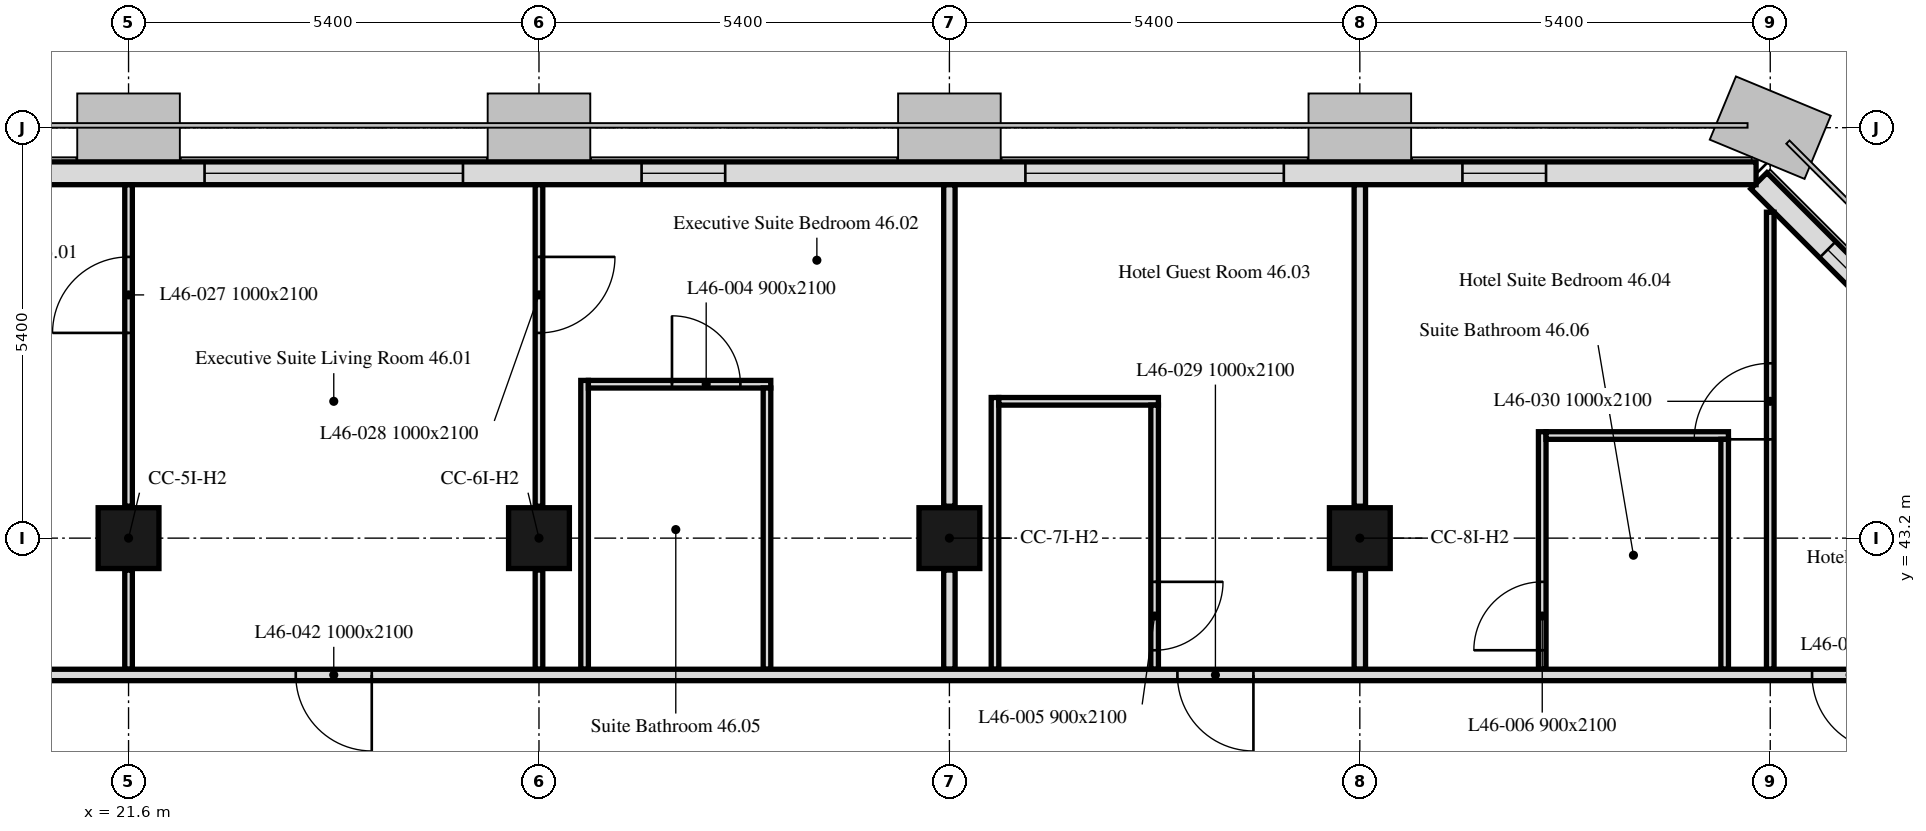
"""IFC4 building model, lengths in metres.
Left out: names, types, materials, properties, quantities, classifications, styles, units other than length and angle.
Written with IfcOpenShell. Run it as: python <this file> out.ifc"""

import sys

from ifc_helpers import new_model, si_unit, direction, frame, frame_2d, origin, origin_2d, place, context, subcontext, project, spatial, rectangle, extrude, element, fill, save


model = new_model("IFC4")
c1 = context("Model", 3, precision=1e-05, world=origin(), true_north=direction((0.0, 1.0)))
c2 = subcontext(c1, "Body", "Model", "MODEL_VIEW")
j1 = project(units=[si_unit("LENGTHUNIT", "METRE"), si_unit("PLANEANGLEUNIT", "RADIAN")], contexts=[c1])
p1 = place(None, origin())
s1 = spatial("IfcSite", under=j1, at=p1, CompositionType="ELEMENT")
p2 = place(p1, origin())
s2 = spatial("IfcBuilding", under=s1, at=p2, CompositionType="ELEMENT")
p3 = place(p2, frame((0.0, 0.0, 190.6)))
s3 = spatial("IfcBuildingStorey", under=s2, at=p3, CompositionType="ELEMENT", Elevation=190.6)
for number, where, z_axis, x_axis in (
    (1, (21.6, 43.2, 0.0), (0.0, 0.0, 1.0), (1.0, 0.0, 0.0)),
    (2, (27.0, 43.2, 0.0), (0.0, 0.0, 1.0), (1.0, 0.0, 0.0)),
    (3, (32.4, 43.2, 0.0), (0.0, 0.0, 1.0), (1.0, 0.0, 0.0)),
    (4, (37.8, 43.2, 0.0), (0.0, 0.0, 1.0), (1.0, 0.0, 0.0)),
):
    element("IfcColumn", number, at=place(p3, frame(where, z_axis=z_axis, x_axis=x_axis)), inside=s3, PredefinedType="COLUMN", context=c2, shape_type="SweptSolid", body=[
        extrude(rectangle(XDim=0.8, YDim=0.8, at=origin_2d()), origin(), (0.0, 0.0, 1.0), 3.0),
    ])
p4 = place(p3, frame((47.901, 43.051, 0.0), z_axis=(0.0, 0.0, 1.0), x_axis=(-0.707106781187, 0.707106781187, 0.0)))
e5 = element("IfcWall", 5, at=p4, inside=s3, PredefinedType="SOLIDWALL", context=c2, shape_type="SweptSolid", body=[
    extrude(rectangle(XDim=6.86, YDim=0.3, at=frame_2d((3.43, 0.0))), origin(), (0.0, 0.0, 1.0), 3.0),
])
p5 = place(p4, frame((1.28, 0.0, 0.9)))
e6 = element("IfcOpeningElement", 6, at=p5, cuts=e5, PredefinedType="OPENING", context=c2, shape_type="SweptSolid", body=[
    extrude(rectangle(XDim=1.1, YDim=1.7, at=frame_2d((0.55, 0.85))), frame((0.0, 0.16, 0.0), z_axis=(0.0, -1.0, 0.0), x_axis=(1.0, 0.0, 0.0)), (0.0, 0.0, 1.0), 0.32),
])
p6 = place(p4, frame((4.48, 0.0, 0.9)))
e7 = element("IfcOpeningElement", 7, at=p6, cuts=e5, PredefinedType="OPENING", context=c2, shape_type="SweptSolid", body=[
    extrude(rectangle(XDim=1.1, YDim=1.7, at=frame_2d((0.55, 0.85))), frame((0.0, 0.16, 0.0), z_axis=(0.0, -1.0, 0.0), x_axis=(1.0, 0.0, 0.0)), (0.0, 0.0, 1.0), 0.32),
])
p7 = place(p3, frame((43.014, 48.0, 0.0), z_axis=(0.0, 0.0, 1.0), x_axis=(-1.0, 0.0, 0.0)))
e8 = element("IfcWall", 8, at=p7, inside=s3, PredefinedType="SOLIDWALL", context=c2, shape_type="SweptSolid", body=[
    extrude(rectangle(XDim=32.027, YDim=0.3, at=frame_2d((16.014, 0.0))), origin(), (0.0, 0.0, 1.0), 3.0),
])
p8 = place(p7, frame((2.764, 0.0, 0.9)))
e9 = element("IfcOpeningElement", 9, at=p8, cuts=e8, PredefinedType="OPENING", context=c2, shape_type="SweptSolid", body=[
    extrude(rectangle(XDim=1.1, YDim=1.7, at=frame_2d((0.55, 0.85))), frame((0.0, 0.16, 0.0), z_axis=(0.0, -1.0, 0.0), x_axis=(1.0, 0.0, 0.0)), (0.0, 0.0, 1.0), 0.32),
])
p9 = place(p7, frame((6.214, 0.0, 0.9)))
e10 = element("IfcOpeningElement", 10, at=p9, cuts=e8, PredefinedType="OPENING", context=c2, shape_type="SweptSolid", body=[
    extrude(rectangle(XDim=3.4, YDim=1.7, at=frame_2d((1.7, 0.85))), frame((0.0, 0.16, 0.0), z_axis=(0.0, -1.0, 0.0), x_axis=(1.0, 0.0, 0.0)), (0.0, 0.0, 1.0), 0.32),
])
p10 = place(p7, frame((13.564, 0.0, 0.9)))
e11 = element("IfcOpeningElement", 11, at=p10, cuts=e8, PredefinedType="OPENING", context=c2, shape_type="SweptSolid", body=[
    extrude(rectangle(XDim=1.1, YDim=1.7, at=frame_2d((0.55, 0.85))), frame((0.0, 0.16, 0.0), z_axis=(0.0, -1.0, 0.0), x_axis=(1.0, 0.0, 0.0)), (0.0, 0.0, 1.0), 0.32),
])
p11 = place(p7, frame((17.014, 0.0, 0.9)))
e12 = element("IfcOpeningElement", 12, at=p11, cuts=e8, PredefinedType="OPENING", context=c2, shape_type="SweptSolid", body=[
    extrude(rectangle(XDim=3.4, YDim=1.7, at=frame_2d((1.7, 0.85))), frame((0.0, 0.16, 0.0), z_axis=(0.0, -1.0, 0.0), x_axis=(1.0, 0.0, 0.0)), (0.0, 0.0, 1.0), 0.32),
])
p12 = place(p7, frame((24.364, 0.0, 0.9)))
e13 = element("IfcOpeningElement", 13, at=p12, cuts=e8, PredefinedType="OPENING", context=c2, shape_type="SweptSolid", body=[
    extrude(rectangle(XDim=1.1, YDim=1.7, at=frame_2d((0.55, 0.85))), frame((0.0, 0.16, 0.0), z_axis=(0.0, -1.0, 0.0), x_axis=(1.0, 0.0, 0.0)), (0.0, 0.0, 1.0), 0.32),
])
p13 = place(p7, frame((27.814, 0.0, 0.9)))
e14 = element("IfcOpeningElement", 14, at=p13, cuts=e8, PredefinedType="OPENING", context=c2, shape_type="SweptSolid", body=[
    extrude(rectangle(XDim=3.4, YDim=1.7, at=frame_2d((1.7, 0.85))), frame((0.0, 0.16, 0.0), z_axis=(0.0, -1.0, 0.0), x_axis=(1.0, 0.0, 0.0)), (0.0, 0.0, 1.0), 0.32),
])
p14 = place(p3, frame((21.6, 41.475, 0.0), z_axis=(0.0, 0.0, 1.0), x_axis=(0.0, 1.0, 0.0)))
e15 = element("IfcWall", 15, at=p14, inside=s3, PredefinedType="PARTITIONING", context=c2, shape_type="SweptSolid", body=[
    extrude(rectangle(XDim=1.305, YDim=0.1, at=frame_2d((0.652, 0.0))), origin(), (0.0, 0.0, 1.0), 2.4),
])
p15 = place(p3, frame((21.6, 43.62, 0.0), z_axis=(0.0, 0.0, 1.0), x_axis=(0.0, 1.0, 0.0)))
e16 = element("IfcWall", 16, at=p15, inside=s3, PredefinedType="PARTITIONING", context=c2, shape_type="SweptSolid", body=[
    extrude(rectangle(XDim=4.229, YDim=0.1, at=frame_2d((2.115, 0.0))), origin(), (0.0, 0.0, 1.0), 2.4),
])
p16 = place(p15, frame((2.28, 0.0, 0.0)))
e17 = element("IfcOpeningElement", 17, at=p16, cuts=e16, PredefinedType="OPENING", context=c2, shape_type="SweptSolid", body=[
    extrude(rectangle(XDim=1.0, YDim=2.1, at=frame_2d((0.5, 1.05))), frame((0.0, 0.05, 0.0), z_axis=(0.0, -1.0, 0.0), x_axis=(1.0, 0.0, 0.0)), (0.0, 0.0, 1.0), 0.1),
])
p17 = place(p3, frame((27.0, 47.849, 0.0), z_axis=(0.0, 0.0, 1.0), x_axis=(0.0, -1.0, 0.0)))
e18 = element("IfcWall", 18, at=p17, inside=s3, PredefinedType="PARTITIONING", context=c2, shape_type="SweptSolid", body=[
    extrude(rectangle(XDim=4.229, YDim=0.1, at=frame_2d((2.115, 0.0))), origin(), (0.0, 0.0, 1.0), 2.4),
])
p18 = place(p17, frame((0.949, 0.0, 0.0)))
e19 = element("IfcOpeningElement", 19, at=p18, cuts=e18, PredefinedType="OPENING", context=c2, shape_type="SweptSolid", body=[
    extrude(rectangle(XDim=1.0, YDim=2.1, at=frame_2d((0.5, 1.05))), frame((0.0, 0.05, 0.0), z_axis=(0.0, -1.0, 0.0), x_axis=(1.0, 0.0, 0.0)), (0.0, 0.0, 1.0), 0.1),
])
p19 = place(p3, frame((27.0, 42.78, 0.0), z_axis=(0.0, 0.0, 1.0), x_axis=(0.0, -1.0, 0.0)))
e20 = element("IfcWall", 20, at=p19, inside=s3, PredefinedType="PARTITIONING", context=c2, shape_type="SweptSolid", body=[
    extrude(rectangle(XDim=1.305, YDim=0.1, at=frame_2d((0.652, 0.0))), origin(), (0.0, 0.0, 1.0), 2.4),
])
p20 = place(p3, frame((27.6, 41.475, 0.0), z_axis=(0.0, 0.0, 1.0), x_axis=(0.0, 1.0, 0.0)))
e21 = element("IfcWall", 21, at=p20, inside=s3, PredefinedType="PARTITIONING", context=c2, shape_type="SweptSolid", body=[
    extrude(rectangle(XDim=3.8, YDim=0.1, at=frame_2d((1.9, 0.0))), origin(), (0.0, 0.0, 1.0), 3.0),
])
p21 = place(p3, frame((27.65, 45.225, 0.0), z_axis=(0.0, 0.0, 1.0), x_axis=(1.0, 0.0, 0.0)))
e22 = element("IfcWall", 22, at=p21, inside=s3, PredefinedType="PARTITIONING", context=c2, shape_type="SweptSolid", body=[
    extrude(rectangle(XDim=2.4, YDim=0.1, at=frame_2d((1.2, 0.0))), origin(), (0.0, 0.0, 1.0), 3.0),
])
p22 = place(p21, frame((1.1, 0.0, 0.0)))
e23 = element("IfcOpeningElement", 23, at=p22, cuts=e22, PredefinedType="OPENING", context=c2, shape_type="SweptSolid", body=[
    extrude(rectangle(XDim=0.9, YDim=2.1, at=frame_2d((0.45, 1.05))), frame((0.0, 0.05, 0.0), z_axis=(0.0, -1.0, 0.0), x_axis=(1.0, 0.0, 0.0)), (0.0, 0.0, 1.0), 0.1),
])
p23 = place(p3, frame((30.0, 45.175, 0.0), z_axis=(0.0, 0.0, 1.0), x_axis=(0.0, -1.0, 0.0)))
e24 = element("IfcWall", 24, at=p23, inside=s3, PredefinedType="PARTITIONING", context=c2, shape_type="SweptSolid", body=[
    extrude(rectangle(XDim=3.7, YDim=0.1, at=frame_2d((1.85, 0.0))), origin(), (0.0, 0.0, 1.0), 3.0),
])
p24 = place(p3, frame((32.4, 41.475, 0.0), z_axis=(0.0, 0.0, 1.0), x_axis=(0.0, 1.0, 0.0)))
e25 = element("IfcWall", 25, at=p24, inside=s3, PredefinedType="PARTITIONING", context=c2, shape_type="SweptSolid", body=[
    extrude(rectangle(XDim=1.305, YDim=0.15, at=frame_2d((0.652, 0.0))), origin(), (0.0, 0.0, 1.0), 2.4),
])
p25 = place(p3, frame((32.4, 43.62, 0.0), z_axis=(0.0, 0.0, 1.0), x_axis=(0.0, 1.0, 0.0)))
e26 = element("IfcWall", 26, at=p25, inside=s3, PredefinedType="PARTITIONING", context=c2, shape_type="SweptSolid", body=[
    extrude(rectangle(XDim=4.229, YDim=0.15, at=frame_2d((2.115, 0.0))), origin(), (0.0, 0.0, 1.0), 2.4),
])
p26 = place(p3, frame((33.0, 41.475, 0.0), z_axis=(0.0, 0.0, 1.0), x_axis=(0.0, 1.0, 0.0)))
e27 = element("IfcWall", 27, at=p26, inside=s3, PredefinedType="PARTITIONING", context=c2, shape_type="SweptSolid", body=[
    extrude(rectangle(XDim=3.575, YDim=0.1, at=frame_2d((1.788, 0.0))), origin(), (0.0, 0.0, 1.0), 3.0),
])
p27 = place(p3, frame((33.05, 45.0, 0.0), z_axis=(0.0, 0.0, 1.0), x_axis=(1.0, 0.0, 0.0)))
e28 = element("IfcWall", 28, at=p27, inside=s3, PredefinedType="PARTITIONING", context=c2, shape_type="SweptSolid", body=[
    extrude(rectangle(XDim=2.1, YDim=0.1, at=frame_2d((1.05, 0.0))), origin(), (0.0, 0.0, 1.0), 3.0),
])
p28 = place(p3, frame((35.1, 44.95, 0.0), z_axis=(0.0, 0.0, 1.0), x_axis=(0.0, -1.0, 0.0)))
e29 = element("IfcWall", 29, at=p28, inside=s3, PredefinedType="PARTITIONING", context=c2, shape_type="SweptSolid", body=[
    extrude(rectangle(XDim=3.475, YDim=0.1, at=frame_2d((1.737, 0.0))), origin(), (0.0, 0.0, 1.0), 3.0),
])
p29 = place(p28, frame((2.325, 0.0, 0.0)))
e30 = element("IfcOpeningElement", 30, at=p29, cuts=e29, PredefinedType="OPENING", context=c2, shape_type="SweptSolid", body=[
    extrude(rectangle(XDim=0.9, YDim=2.1, at=frame_2d((0.45, 1.05))), frame((0.0, 0.05, 0.0), z_axis=(0.0, -1.0, 0.0), x_axis=(1.0, 0.0, 0.0)), (0.0, 0.0, 1.0), 0.1),
])
p30 = place(p3, frame((37.8, 41.475, 0.0), z_axis=(0.0, 0.0, 1.0), x_axis=(0.0, 1.0, 0.0)))
e31 = element("IfcWall", 31, at=p30, inside=s3, PredefinedType="PARTITIONING", context=c2, shape_type="SweptSolid", body=[
    extrude(rectangle(XDim=1.305, YDim=0.15, at=frame_2d((0.652, 0.0))), origin(), (0.0, 0.0, 1.0), 2.4),
])
p31 = place(p3, frame((37.8, 43.62, 0.0), z_axis=(0.0, 0.0, 1.0), x_axis=(0.0, 1.0, 0.0)))
e32 = element("IfcWall", 32, at=p31, inside=s3, PredefinedType="PARTITIONING", context=c2, shape_type="SweptSolid", body=[
    extrude(rectangle(XDim=4.229, YDim=0.15, at=frame_2d((2.115, 0.0))), origin(), (0.0, 0.0, 1.0), 2.4),
])
p32 = place(p3, frame((40.2, 41.475, 0.0), z_axis=(0.0, 0.0, 1.0), x_axis=(0.0, 1.0, 0.0)))
e33 = element("IfcWall", 33, at=p32, inside=s3, PredefinedType="PARTITIONING", context=c2, shape_type="SweptSolid", body=[
    extrude(rectangle(XDim=3.125, YDim=0.1, at=frame_2d((1.562, 0.0))), origin(), (0.0, 0.0, 1.0), 3.0),
])
p33 = place(p32, frame((0.25, 0.0, 0.0)))
e34 = element("IfcOpeningElement", 34, at=p33, cuts=e33, PredefinedType="OPENING", context=c2, shape_type="SweptSolid", body=[
    extrude(rectangle(XDim=0.9, YDim=2.1, at=frame_2d((0.45, 1.05))), frame((0.0, 0.05, 0.0), z_axis=(0.0, -1.0, 0.0), x_axis=(1.0, 0.0, 0.0)), (0.0, 0.0, 1.0), 0.1),
])
p34 = place(p3, frame((40.25, 44.55, 0.0), z_axis=(0.0, 0.0, 1.0), x_axis=(1.0, 0.0, 0.0)))
e35 = element("IfcWall", 35, at=p34, inside=s3, PredefinedType="PARTITIONING", context=c2, shape_type="SweptSolid", body=[
    extrude(rectangle(XDim=2.4, YDim=0.1, at=frame_2d((1.2, 0.0))), origin(), (0.0, 0.0, 1.0), 3.0),
])
p35 = place(p3, frame((42.6, 44.5, 0.0), z_axis=(0.0, 0.0, 1.0), x_axis=(0.0, -1.0, 0.0)))
e36 = element("IfcWall", 36, at=p35, inside=s3, PredefinedType="PARTITIONING", context=c2, shape_type="SweptSolid", body=[
    extrude(rectangle(XDim=3.025, YDim=0.1, at=frame_2d((1.512, 0.0))), origin(), (0.0, 0.0, 1.0), 3.0),
])
p36 = place(p3, frame((43.2, 41.475, 0.0), z_axis=(0.0, 0.0, 1.0), x_axis=(0.0, 1.0, 0.0)))
e37 = element("IfcWall", 37, at=p36, inside=s3, PredefinedType="PARTITIONING", context=c2, shape_type="SweptSolid", body=[
    extrude(rectangle(XDim=6.013, YDim=0.1, at=frame_2d((3.006, 0.0))), origin(), (0.0, 0.0, 1.0), 3.0),
])
p37 = place(p36, frame((3.025, 0.0, 0.0)))
e38 = element("IfcOpeningElement", 38, at=p37, cuts=e37, PredefinedType="OPENING", context=c2, shape_type="SweptSolid", body=[
    extrude(rectangle(XDim=1.0, YDim=2.1, at=frame_2d((0.5, 1.05))), frame((0.0, 0.05, 0.0), z_axis=(0.0, -1.0, 0.0), x_axis=(1.0, 0.0, 0.0)), (0.0, 0.0, 1.0), 0.1),
])
p38 = place(p3, frame((47.849, 41.4, 0.0), z_axis=(0.0, 0.0, 1.0), x_axis=(-1.0, 0.0, 0.0)))
e39 = element("IfcWall", 39, at=p38, inside=s3, PredefinedType="PARTITIONING", context=c2, shape_type="SweptSolid", body=[
    extrude(rectangle(XDim=41.698, YDim=0.15, at=frame_2d((20.849, 0.0))), origin(), (0.0, 0.0, 1.0), 2.4),
])
p39 = place(p38, frame((39.249, 0.0, 0.0)))
e40 = element("IfcOpeningElement", 40, at=p39, cuts=e39, PredefinedType="OPENING", context=c2, shape_type="SweptSolid", body=[
    extrude(rectangle(XDim=1.0, YDim=2.1, at=frame_2d((0.5, 1.05))), frame((0.0, 0.075, 0.0), z_axis=(0.0, -1.0, 0.0), x_axis=(1.0, 0.0, 0.0)), (0.0, 0.0, 1.0), 0.15),
])
p40 = place(p38, frame((11.449, 0.0, 0.0)))
e41 = element("IfcOpeningElement", 41, at=p40, cuts=e39, PredefinedType="OPENING", context=c2, shape_type="SweptSolid", body=[
    extrude(rectangle(XDim=1.0, YDim=2.1, at=frame_2d((0.5, 1.05))), frame((0.0, 0.075, 0.0), z_axis=(0.0, -1.0, 0.0), x_axis=(1.0, 0.0, 0.0)), (0.0, 0.0, 1.0), 0.15),
])
p41 = place(p38, frame((3.099, 0.0, 0.0)))
e42 = element("IfcOpeningElement", 42, at=p41, cuts=e39, PredefinedType="OPENING", context=c2, shape_type="SweptSolid", body=[
    extrude(rectangle(XDim=1.0, YDim=2.1, at=frame_2d((0.5, 1.05))), frame((0.0, 0.075, 0.0), z_axis=(0.0, -1.0, 0.0), x_axis=(1.0, 0.0, 0.0)), (0.0, 0.0, 1.0), 0.15),
])
p42 = place(p38, frame((23.049, 0.0, 0.0)))
e43 = element("IfcOpeningElement", 43, at=p42, cuts=e39, PredefinedType="OPENING", context=c2, shape_type="SweptSolid", body=[
    extrude(rectangle(XDim=1.0, YDim=2.1, at=frame_2d((0.5, 1.05))), frame((0.0, 0.075, 0.0), z_axis=(0.0, -1.0, 0.0), x_axis=(1.0, 0.0, 0.0)), (0.0, 0.0, 1.0), 0.15),
])
p43 = place(p6, origin())
e44 = element("IfcWindow", 44, at=p43, inside=s3, PartitioningType="SINGLE_PANEL", PredefinedType="WINDOW", context=c2, shape_type="SweptSolid", body=[
    extrude(rectangle(XDim=1.1, YDim=1.7, at=frame_2d((0.55, 0.85))), frame((0.0, 0.03, 0.0), z_axis=(0.0, -1.0, 0.0), x_axis=(1.0, 0.0, 0.0)), (0.0, 0.0, 1.0), 0.06),
])
fill(e7, e44)
p44 = place(p8, origin())
e45 = element("IfcWindow", 45, at=p44, inside=s3, PartitioningType="SINGLE_PANEL", PredefinedType="WINDOW", context=c2, shape_type="SweptSolid", body=[
    extrude(rectangle(XDim=1.1, YDim=1.7, at=frame_2d((0.55, 0.85))), frame((0.0, 0.03, 0.0), z_axis=(0.0, -1.0, 0.0), x_axis=(1.0, 0.0, 0.0)), (0.0, 0.0, 1.0), 0.06),
])
fill(e9, e45)
p45 = place(p9, origin())
e46 = element("IfcWindow", 46, at=p45, inside=s3, PartitioningType="SINGLE_PANEL", PredefinedType="WINDOW", context=c2, shape_type="SweptSolid", body=[
    extrude(rectangle(XDim=3.4, YDim=1.7, at=frame_2d((1.7, 0.85))), frame((0.0, 0.03, 0.0), z_axis=(0.0, -1.0, 0.0), x_axis=(1.0, 0.0, 0.0)), (0.0, 0.0, 1.0), 0.06),
])
fill(e10, e46)
p46 = place(p10, origin())
e47 = element("IfcWindow", 47, at=p46, inside=s3, PartitioningType="SINGLE_PANEL", PredefinedType="WINDOW", context=c2, shape_type="SweptSolid", body=[
    extrude(rectangle(XDim=1.1, YDim=1.7, at=frame_2d((0.55, 0.85))), frame((0.0, 0.03, 0.0), z_axis=(0.0, -1.0, 0.0), x_axis=(1.0, 0.0, 0.0)), (0.0, 0.0, 1.0), 0.06),
])
fill(e11, e47)
p47 = place(p11, origin())
e48 = element("IfcWindow", 48, at=p47, inside=s3, PartitioningType="SINGLE_PANEL", PredefinedType="WINDOW", context=c2, shape_type="SweptSolid", body=[
    extrude(rectangle(XDim=3.4, YDim=1.7, at=frame_2d((1.7, 0.85))), frame((0.0, 0.03, 0.0), z_axis=(0.0, -1.0, 0.0), x_axis=(1.0, 0.0, 0.0)), (0.0, 0.0, 1.0), 0.06),
])
fill(e12, e48)
p48 = place(p22, origin())
e49 = element("IfcDoor", 49, at=p48, inside=s3, OperationType="SINGLE_SWING_RIGHT", PredefinedType="DOOR", context=c2, shape_type="SweptSolid", body=[
    extrude(rectangle(XDim=0.9, YDim=2.1, at=frame_2d((0.45, 1.05))), frame((0.0, 0.025, 0.0), z_axis=(0.0, -1.0, 0.0), x_axis=(1.0, 0.0, 0.0)), (0.0, 0.0, 1.0), 0.05),
])
fill(e23, e49)
p49 = place(p29, origin())
e50 = element("IfcDoor", 50, at=p49, inside=s3, OperationType="SINGLE_SWING_RIGHT", PredefinedType="DOOR", context=c2, shape_type="SweptSolid", body=[
    extrude(rectangle(XDim=0.9, YDim=2.1, at=frame_2d((0.45, 1.05))), frame((0.0, 0.025, 0.0), z_axis=(0.0, -1.0, 0.0), x_axis=(1.0, 0.0, 0.0)), (0.0, 0.0, 1.0), 0.05),
])
fill(e30, e50)
p50 = place(p33, origin())
e51 = element("IfcDoor", 51, at=p50, inside=s3, OperationType="SINGLE_SWING_RIGHT", PredefinedType="DOOR", context=c2, shape_type="SweptSolid", body=[
    extrude(rectangle(XDim=0.9, YDim=2.1, at=frame_2d((0.45, 1.05))), frame((0.0, 0.025, 0.0), z_axis=(0.0, -1.0, 0.0), x_axis=(1.0, 0.0, 0.0)), (0.0, 0.0, 1.0), 0.05),
])
fill(e34, e51)
p51 = place(p16, origin())
e52 = element("IfcDoor", 52, at=p51, inside=s3, OperationType="SINGLE_SWING_LEFT", PredefinedType="DOOR", context=c2, shape_type="SweptSolid", body=[
    extrude(rectangle(XDim=1.0, YDim=2.1, at=frame_2d((0.5, 1.05))), frame((0.0, 0.025, 0.0), z_axis=(0.0, -1.0, 0.0), x_axis=(1.0, 0.0, 0.0)), (0.0, 0.0, 1.0), 0.05),
])
fill(e17, e52)
p52 = place(p18, origin())
e53 = element("IfcDoor", 53, at=p52, inside=s3, OperationType="SINGLE_SWING_LEFT", PredefinedType="DOOR", context=c2, shape_type="SweptSolid", body=[
    extrude(rectangle(XDim=1.0, YDim=2.1, at=frame_2d((0.5, 1.05))), frame((0.0, 0.025, 0.0), z_axis=(0.0, -1.0, 0.0), x_axis=(1.0, 0.0, 0.0)), (0.0, 0.0, 1.0), 0.05),
])
fill(e19, e53)
p53 = place(p40, origin())
e54 = element("IfcDoor", 54, at=p53, inside=s3, OperationType="SINGLE_SWING_RIGHT", PredefinedType="DOOR", context=c2, shape_type="SweptSolid", body=[
    extrude(rectangle(XDim=1.0, YDim=2.1, at=frame_2d((0.5, 1.05))), frame((0.0, 0.025, 0.0), z_axis=(0.0, -1.0, 0.0), x_axis=(1.0, 0.0, 0.0)), (0.0, 0.0, 1.0), 0.05),
])
fill(e41, e54)
p54 = place(p37, origin())
e55 = element("IfcDoor", 55, at=p54, inside=s3, OperationType="SINGLE_SWING_RIGHT", PredefinedType="DOOR", context=c2, shape_type="SweptSolid", body=[
    extrude(rectangle(XDim=1.0, YDim=2.1, at=frame_2d((0.5, 1.05))), frame((0.0, 0.025, 0.0), z_axis=(0.0, -1.0, 0.0), x_axis=(1.0, 0.0, 0.0)), (0.0, 0.0, 1.0), 0.05),
])
fill(e38, e55)
p55 = place(p41, origin())
e56 = element("IfcDoor", 56, at=p55, inside=s3, OperationType="SINGLE_SWING_RIGHT", PredefinedType="DOOR", context=c2, shape_type="SweptSolid", body=[
    extrude(rectangle(XDim=1.0, YDim=2.1, at=frame_2d((0.5, 1.05))), frame((0.0, 0.025, 0.0), z_axis=(0.0, -1.0, 0.0), x_axis=(1.0, 0.0, 0.0)), (0.0, 0.0, 1.0), 0.05),
])
fill(e42, e56)
p56 = place(p42, origin())
e57 = element("IfcDoor", 57, at=p56, inside=s3, OperationType="SINGLE_SWING_LEFT", PredefinedType="DOOR", context=c2, shape_type="SweptSolid", body=[
    extrude(rectangle(XDim=1.0, YDim=2.1, at=frame_2d((0.5, 1.05))), frame((0.0, 0.025, 0.0), z_axis=(0.0, -1.0, 0.0), x_axis=(1.0, 0.0, 0.0)), (0.0, 0.0, 1.0), 0.05),
])
fill(e43, e57)
save(model, sys.argv[1])
